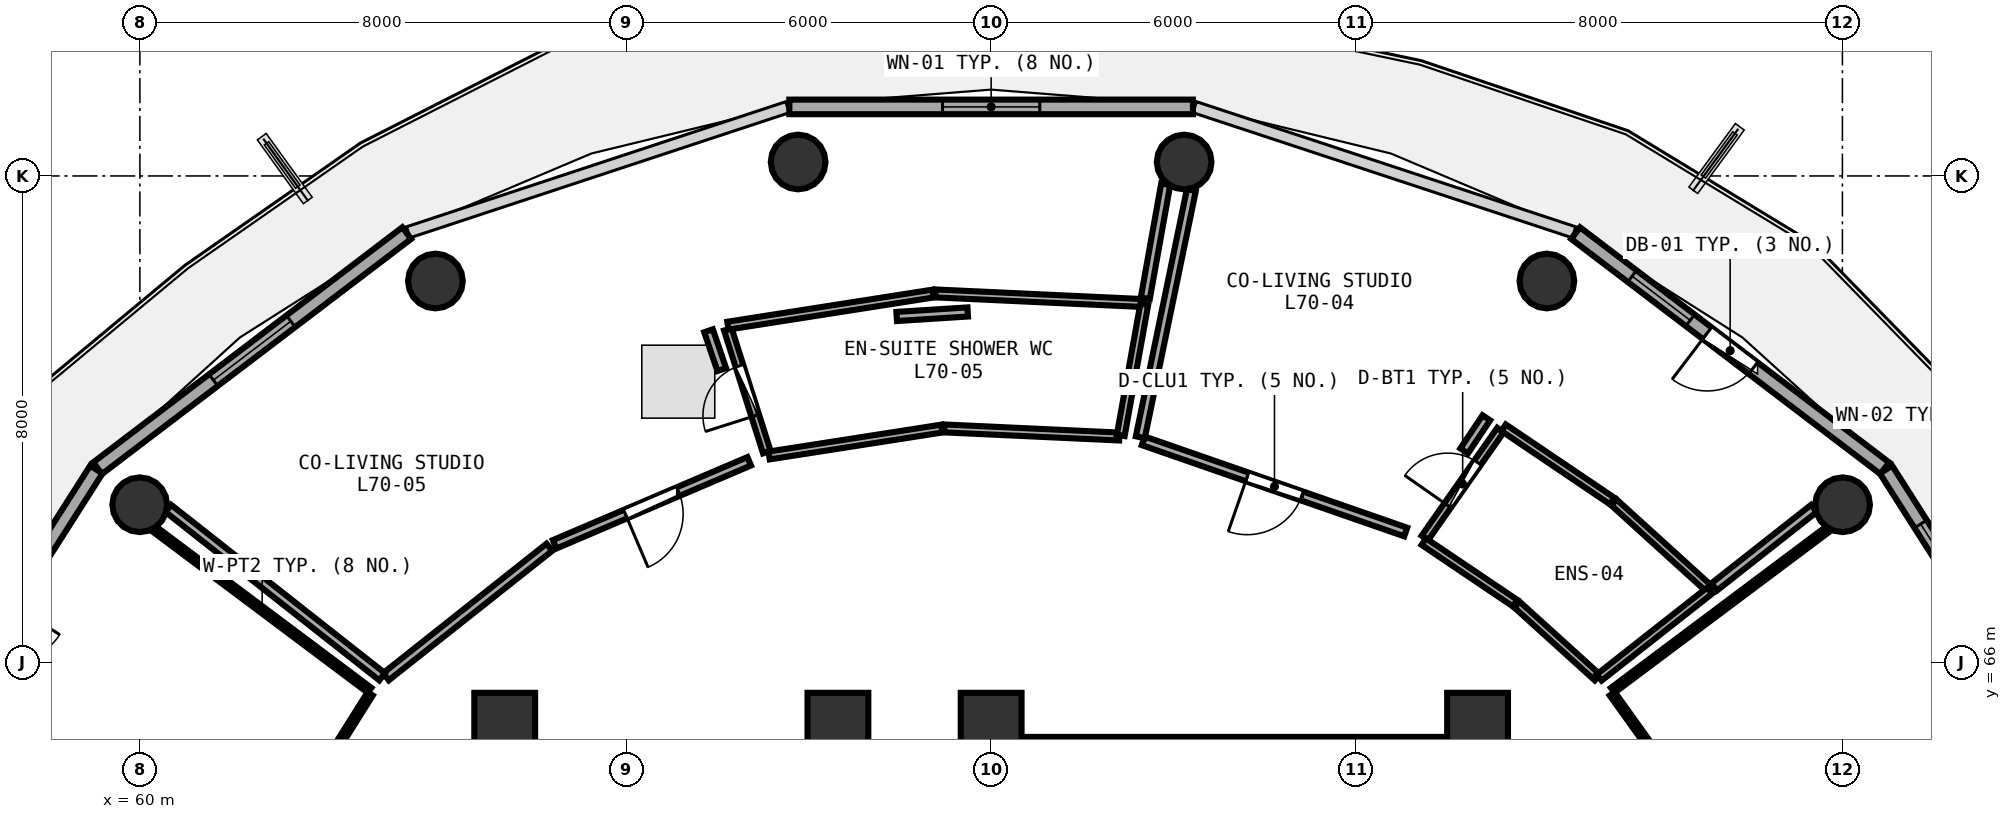
"""IFC4 building model, lengths in metres.
Left out: names, types, materials, properties, quantities, classifications, styles, units other than length and angle.
Written with IfcOpenShell. Run it as: python <this file> out.ifc"""

import sys

from ifc_helpers import new_model, si_unit, direction, frame, frame_2d, origin, origin_2d, place, context, subcontext, project, spatial, rectangle, circle, extrude, element, fill, save


model = new_model("IFC4")
c1 = context("Model", 3, precision=1e-05, world=origin(), true_north=direction((0.0, 1.0)))
c2 = subcontext(c1, "Body", "Model", "MODEL_VIEW")
j1 = project(units=[si_unit("LENGTHUNIT", "METRE"), si_unit("PLANEANGLEUNIT", "RADIAN")], contexts=[c1])
p1 = place(None, origin())
s1 = spatial("IfcSite", under=j1, at=p1, CompositionType="ELEMENT")
p2 = place(p1, origin())
s2 = spatial("IfcBuilding", under=s1, at=p2, CompositionType="ELEMENT")
p3 = place(p2, frame((0.0, 0.0, 274.95)))
s3 = spatial("IfcBuildingStorey", under=s2, at=p3, CompositionType="ELEMENT", Elevation=274.95)
for number, where, z_axis, x_axis in (
    (1, (82.0, 65.0, 0.0), (0.0, 0.0, 1.0), (1.0, 0.0, 0.0)),
    (2, (74.0, 65.0, 0.0), (0.0, 0.0, 1.0), (1.0, 0.0, 0.0)),
    (3, (71.48, 65.0, 0.0), (0.0, 0.0, 1.0), (1.0, 0.0, 0.0)),
    (4, (66.0, 65.0, 0.0), (0.0, 0.0, 1.0), (1.0, 0.0, 0.0)),
):
    element("IfcColumn", number, at=place(p3, frame(where, z_axis=z_axis, x_axis=x_axis)), inside=s3, PredefinedType="PILASTER", context=c2, shape_type="SweptSolid", body=[
        extrude(rectangle(XDim=1.0, YDim=1.0, at=origin_2d()), origin(), (0.0, 0.0, 1.0), 3.75),
    ])
for number, where, z_axis, x_axis in (
    (5, (88.003, 68.593, 0.0), (0.0, 0.0, 1.0), (1.0, 0.0, 0.0)),
    (6, (83.14, 72.272, 0.0), (0.0, 0.0, 1.0), (1.0, 0.0, 0.0)),
    (7, (77.174, 74.229, 0.0), (0.0, 0.0, 1.0), (1.0, 0.0, 0.0)),
    (8, (70.826, 74.229, 0.0), (0.0, 0.0, 1.0), (1.0, 0.0, 0.0)),
    (9, (64.86, 72.272, 0.0), (0.0, 0.0, 1.0), (1.0, 0.0, 0.0)),
    (10, (59.997, 68.593, 0.0), (0.0, 0.0, 1.0), (1.0, 0.0, 0.0)),
):
    element("IfcColumn", number, at=place(p3, frame(where, z_axis=z_axis, x_axis=x_axis)), inside=s3, PredefinedType="COLUMN", context=c2, shape_type="SweptSolid", body=[
        extrude(circle(Radius=0.45, at=origin_2d()), origin(), (0.0, 0.0, 1.0), 3.75),
    ])
p4 = place(p3, frame((92.034, 63.964, 0.0), z_axis=(0.0, 0.0, 1.0), x_axis=(-0.537271968456, 0.843409053728, 0.0)))
e11 = element("IfcWall", 11, at=p4, inside=s3, PredefinedType="SOLIDWALL", context=c2, shape_type="SweptSolid", body=[
    extrude(rectangle(XDim=6.175, YDim=0.24, at=frame_2d((3.087, 0.0))), origin(), (0.0, 0.0, 1.0), 3.475),
])
p5 = place(p4, frame((2.613, 0.0, 0.0)))
e12 = element("IfcOpeningElement", 12, at=p5, cuts=e11, PredefinedType="OPENING", context=c2, shape_type="SweptSolid", body=[
    extrude(rectangle(XDim=0.95, YDim=2.1, at=frame_2d((0.475, 1.05))), frame((0.0, 0.13, 0.0), z_axis=(0.0, -1.0, 0.0), x_axis=(1.0, 0.0, 0.0)), (0.0, 0.0, 1.0), 0.26),
])
p6 = place(p4, frame((3.913, 0.0, 0.85)))
e13 = element("IfcOpeningElement", 13, at=p6, cuts=e11, PredefinedType="OPENING", context=c2, shape_type="SweptSolid", body=[
    extrude(rectangle(XDim=1.2, YDim=1.45, at=frame_2d((0.6, 0.725))), frame((0.0, 0.13, 0.0), z_axis=(0.0, -1.0, 0.0), x_axis=(1.0, 0.0, 0.0)), (0.0, 0.0, 1.0), 0.26),
])
p7 = place(p3, frame((88.696, 69.194, 0.0), z_axis=(0.0, 0.0, 1.0), x_axis=(-0.796010444211, 0.605282886514, 0.0)))
e14 = element("IfcWall", 14, at=p7, inside=s3, PredefinedType="SOLIDWALL", context=c2, shape_type="SweptSolid", body=[
    extrude(rectangle(XDim=6.387, YDim=0.24, at=frame_2d((3.194, 0.0))), origin(), (0.0, 0.0, 1.0), 3.475),
])
p8 = place(p7, frame((2.719, 0.0, 0.0)))
e15 = element("IfcOpeningElement", 15, at=p8, cuts=e14, PredefinedType="OPENING", context=c2, shape_type="SweptSolid", body=[
    extrude(rectangle(XDim=0.95, YDim=2.1, at=frame_2d((0.475, 1.05))), frame((0.0, 0.13, 0.0), z_axis=(0.0, -1.0, 0.0), x_axis=(1.0, 0.0, 0.0)), (0.0, 0.0, 1.0), 0.26),
])
p9 = place(p7, frame((4.019, 0.0, 0.85)))
e16 = element("IfcOpeningElement", 16, at=p9, cuts=e14, PredefinedType="OPENING", context=c2, shape_type="SweptSolid", body=[
    extrude(rectangle(XDim=1.2, YDim=1.45, at=frame_2d((0.6, 0.725))), frame((0.0, 0.13, 0.0), z_axis=(0.0, -1.0, 0.0), x_axis=(1.0, 0.0, 0.0)), (0.0, 0.0, 1.0), 0.26),
])
p10 = place(p3, frame((77.319, 75.136, 0.0), z_axis=(0.0, 0.0, 1.0), x_axis=(-1.0, 0.0, 0.0)))
e17 = element("IfcWall", 17, at=p10, inside=s3, PredefinedType="SOLIDWALL", context=c2, shape_type="SweptSolid", body=[
    extrude(rectangle(XDim=6.638, YDim=0.24, at=frame_2d((3.319, 0.0))), origin(), (0.0, 0.0, 1.0), 3.475),
])
p11 = place(p10, frame((2.519, 0.0, 0.85)))
e18 = element("IfcOpeningElement", 18, at=p11, cuts=e17, PredefinedType="OPENING", context=c2, shape_type="SweptSolid", body=[
    extrude(rectangle(XDim=1.6, YDim=1.45, at=frame_2d((0.8, 0.725))), frame((0.0, 0.13, 0.0), z_axis=(0.0, -1.0, 0.0), x_axis=(1.0, 0.0, 0.0)), (0.0, 0.0, 1.0), 0.26),
])
p12 = place(p3, frame((64.388, 73.06, 0.0), z_axis=(0.0, 0.0, 1.0), x_axis=(-0.796010444211, -0.605282886514, 0.0)))
e19 = element("IfcWall", 19, at=p12, inside=s3, PredefinedType="SOLIDWALL", context=c2, shape_type="SweptSolid", body=[
    extrude(rectangle(XDim=6.387, YDim=0.24, at=frame_2d((3.194, 0.0))), origin(), (0.0, 0.0, 1.0), 3.475),
])
p13 = place(p12, frame((2.394, 0.0, 0.85)))
e20 = element("IfcOpeningElement", 20, at=p13, cuts=e19, PredefinedType="OPENING", context=c2, shape_type="SweptSolid", body=[
    extrude(rectangle(XDim=1.6, YDim=1.45, at=frame_2d((0.8, 0.725))), frame((0.0, 0.13, 0.0), z_axis=(0.0, -1.0, 0.0), x_axis=(1.0, 0.0, 0.0)), (0.0, 0.0, 1.0), 0.26),
])
p14 = place(p3, frame((59.284, 69.172, 0.0), z_axis=(0.0, 0.0, 1.0), x_axis=(-0.537271968456, -0.843409053728, 0.0)))
e21 = element("IfcWall", 21, at=p14, inside=s3, PredefinedType="SOLIDWALL", context=c2, shape_type="SweptSolid", body=[
    extrude(rectangle(XDim=6.175, YDim=0.24, at=frame_2d((3.087, 0.0))), origin(), (0.0, 0.0, 1.0), 3.475),
])
p15 = place(p14, frame((2.613, 0.0, 0.0)))
e22 = element("IfcOpeningElement", 22, at=p15, cuts=e21, PredefinedType="OPENING", context=c2, shape_type="SweptSolid", body=[
    extrude(rectangle(XDim=0.95, YDim=2.1, at=frame_2d((0.475, 1.05))), frame((0.0, 0.13, 0.0), z_axis=(0.0, -1.0, 0.0), x_axis=(1.0, 0.0, 0.0)), (0.0, 0.0, 1.0), 0.26),
])
p16 = place(p14, frame((3.913, 0.0, 0.85)))
e23 = element("IfcOpeningElement", 23, at=p16, cuts=e21, PredefinedType="OPENING", context=c2, shape_type="SweptSolid", body=[
    extrude(rectangle(XDim=1.2, YDim=1.45, at=frame_2d((0.6, 0.725))), frame((0.0, 0.13, 0.0), z_axis=(0.0, -1.0, 0.0), x_axis=(1.0, 0.0, 0.0)), (0.0, 0.0, 1.0), 0.26),
])
p17 = place(p3, frame((74.0, 64.6, 0.0), z_axis=(0.0, 0.0, 1.0), x_axis=(1.0, 0.0, 0.0)))
e24 = element("IfcWall", 24, at=p17, inside=s3, PredefinedType="SHEAR", context=c2, shape_type="SweptSolid", body=[
    extrude(rectangle(XDim=8.0, YDim=0.35, at=frame_2d((4.0, 0.0))), origin(), (0.0, 0.0, 1.0), 3.49),
])
p18 = place(p3, frame((81.133, 68.047, 0.0), z_axis=(0.0, 0.0, 1.0), x_axis=(0.573764741577, 0.81902015929, 0.0)))
e25 = element("IfcWall", 25, at=p18, inside=s3, PredefinedType="PLUMBINGWALL", context=c2, shape_type="SweptSolid", body=[
    extrude(rectangle(XDim=2.167, YDim=0.13, at=frame_2d((1.083, 0.0))), origin(), (0.0, 0.0, 1.0), 3.175),
])
p19 = place(p18, frame((0.653, 0.0, 0.0)))
e26 = element("IfcOpeningElement", 26, at=p19, cuts=e25, PredefinedType="OPENING", context=c2, shape_type="SweptSolid", body=[
    extrude(rectangle(XDim=0.86, YDim=2.05, at=frame_2d((0.43, 1.025))), frame((0.0, 0.075, 0.0), z_axis=(0.0, -1.0, 0.0), x_axis=(1.0, 0.0, 0.0)), (0.0, 0.0, 1.0), 0.15),
])
p20 = place(p3, frame((80.818, 68.145, 0.0), z_axis=(0.0, 0.0, 1.0), x_axis=(-0.944627899296, 0.328143462331, 0.0)))
e27 = element("IfcWall", 27, at=p20, inside=s3, PredefinedType="PARTITIONING", context=c2, shape_type="SweptSolid", body=[
    extrude(rectangle(XDim=4.57, YDim=0.15, at=frame_2d((2.285, 0.0))), origin(), (0.0, 0.0, 1.0), 3.48),
])
p21 = place(p20, frame((1.81, 0.0, 0.0)))
e28 = element("IfcOpeningElement", 28, at=p21, cuts=e27, PredefinedType="OPENING", context=c2, shape_type="SweptSolid", body=[
    extrude(rectangle(XDim=0.95, YDim=2.08, at=frame_2d((0.475, 1.04))), frame((0.0, 0.085, 0.0), z_axis=(0.0, -1.0, 0.0), x_axis=(1.0, 0.0, 0.0)), (0.0, 0.0, 1.0), 0.17),
])
p22 = place(p3, frame((70.311, 69.457, 0.0), z_axis=(0.0, 0.0, 1.0), x_axis=(-0.302652199947, 0.953101068023, 0.0)))
e29 = element("IfcWall", 29, at=p22, inside=s3, PredefinedType="PLUMBINGWALL", context=c2, shape_type="SweptSolid", body=[
    extrude(rectangle(XDim=2.12, YDim=0.13, at=frame_2d((1.06, 0.0))), origin(), (0.0, 0.0, 1.0), 3.175),
])
p23 = place(p22, frame((0.63, 0.0, 0.0)))
e30 = element("IfcOpeningElement", 30, at=p23, cuts=e29, PredefinedType="OPENING", context=c2, shape_type="SweptSolid", body=[
    extrude(rectangle(XDim=0.86, YDim=2.05, at=frame_2d((0.43, 1.025))), frame((0.0, 0.075, 0.0), z_axis=(0.0, -1.0, 0.0), x_axis=(1.0, 0.0, 0.0)), (0.0, 0.0, 1.0), 0.15),
])
p24 = place(p3, frame((70.021, 69.308, 0.0), z_axis=(0.0, 0.0, 1.0), x_axis=(-0.919764656354, -0.392470351647, 0.0)))
e31 = element("IfcWall", 31, at=p24, inside=s3, PredefinedType="PARTITIONING", context=c2, shape_type="SweptSolid", body=[
    extrude(rectangle(XDim=3.479, YDim=0.15, at=frame_2d((1.739, 0.0))), origin(), (0.0, 0.0, 1.0), 3.235),
])
p25 = place(p24, frame((1.264, 0.0, 0.0)))
e32 = element("IfcOpeningElement", 32, at=p25, cuts=e31, PredefinedType="OPENING", context=c2, shape_type="SweptSolid", body=[
    extrude(rectangle(XDim=0.95, YDim=2.08, at=frame_2d((0.475, 1.04))), frame((0.0, 0.085, 0.0), z_axis=(0.0, -1.0, 0.0), x_axis=(1.0, 0.0, 0.0)), (0.0, 0.0, 1.0), 0.17),
])
p26 = place(p3, frame((85.77, 63.316, 0.0), z_axis=(0.0, 0.0, 1.0), x_axis=(-0.582725386778, 0.812669135383, 0.0)))
e33 = element("IfcWall", 33, at=p26, inside=s3, PredefinedType="PARTITIONING", context=c2, shape_type="SweptSolid", body=[
    extrude(rectangle(XDim=2.669, YDim=0.1, at=frame_2d((1.334, 0.0))), origin(), (0.0, 0.0, 1.0), 3.075),
])
p27 = place(p3, frame((84.223, 65.542, 0.0), z_axis=(0.0, 0.0, 1.0), x_axis=(0.800384816546, 0.599486568191, 0.0)))
e34 = element("IfcWall", 34, at=p27, inside=s3, PredefinedType="PARTITIONING", context=c2, shape_type="SweptSolid", body=[
    extrude(rectangle(XDim=4.414, YDim=0.1, at=frame_2d((2.207, 0.0))), origin(), (0.0, 0.0, 1.0), 3.175),
])
p28 = place(p3, frame((83.97, 65.753, 0.0), z_axis=(0.0, 0.0, 1.0), x_axis=(-0.741337974143, 0.671131885767, 0.0)))
e35 = element("IfcWall", 35, at=p28, inside=s3, PredefinedType="PLUMBINGWALL", context=c2, shape_type="SweptSolid", body=[
    extrude(rectangle(XDim=1.784, YDim=0.13, at=frame_2d((0.892, 0.0))), origin(), (0.0, 0.0, 1.0), 3.075),
])
p29 = place(p3, frame((82.616, 66.975, 0.0), z_axis=(0.0, 0.0, 1.0), x_axis=(-0.82921750612, 0.558926048367, 0.0)))
e36 = element("IfcWall", 36, at=p29, inside=s3, PredefinedType="PLUMBINGWALL", context=c2, shape_type="SweptSolid", body=[
    extrude(rectangle(XDim=1.81, YDim=0.13, at=frame_2d((0.905, 0.0))), origin(), (0.0, 0.0, 1.0), 3.075),
])
p30 = place(p3, frame((82.427, 69.86, 0.0), z_axis=(0.0, 0.0, 1.0), x_axis=(0.828897302699, -0.559400805843, 0.0)))
e37 = element("IfcWall", 37, at=p30, inside=s3, PredefinedType="PLUMBINGWALL", context=c2, shape_type="SweptSolid", body=[
    extrude(rectangle(XDim=2.153, YDim=0.13, at=frame_2d((1.077, 0.0))), origin(), (0.0, 0.0, 1.0), 3.075),
])
p31 = place(p3, frame((84.244, 68.631, 0.0), z_axis=(0.0, 0.0, 1.0), x_axis=(0.740450028949, -0.672111415339, 0.0)))
e38 = element("IfcWall", 38, at=p31, inside=s3, PredefinedType="PLUMBINGWALL", context=c2, shape_type="SweptSolid", body=[
    extrude(rectangle(XDim=2.122, YDim=0.13, at=frame_2d((1.061, 0.0))), origin(), (0.0, 0.0, 1.0), 3.075),
])
p32 = place(p3, frame((85.814, 67.179, 0.0), z_axis=(0.0, 0.0, 1.0), x_axis=(-0.786024493366, -0.618195354098, 0.0)))
e39 = element("IfcWall", 39, at=p32, inside=s3, PredefinedType="PLUMBINGWALL", context=c2, shape_type="SweptSolid", body=[
    extrude(rectangle(XDim=2.307, YDim=0.13, at=frame_2d((1.154, 0.0))), origin(), (0.0, 0.0, 1.0), 3.075),
])
p33 = place(p3, frame((76.453, 69.703, 0.0), z_axis=(0.0, 0.0, 1.0), x_axis=(0.202308141573, 0.979321916355, 0.0)))
e40 = element("IfcWall", 40, at=p33, inside=s3, PredefinedType="PARTITIONING", context=c2, shape_type="SweptSolid", body=[
    extrude(rectangle(XDim=4.153, YDim=0.15, at=frame_2d((2.076, 0.0))), origin(), (0.0, 0.0, 1.0), 3.175),
])
p34 = place(p3, frame((87.532, 68.533, 0.0), z_axis=(0.0, 0.0, 1.0), x_axis=(-0.785863630792, -0.618399833278, 0.0)))
e41 = element("IfcWall", 41, at=p34, inside=s3, PredefinedType="PARTITIONING", context=c2, shape_type="SweptSolid", body=[
    extrude(rectangle(XDim=2.088, YDim=0.15, at=frame_2d((1.044, 0.0))), origin(), (0.0, 0.0, 1.0), 3.075),
])
p35 = place(p3, frame((82.144, 70.023, 0.0), z_axis=(0.0, 0.0, 1.0), x_axis=(-0.555818041334, -0.831303978655, 0.0)))
e42 = element("IfcWall", 42, at=p35, inside=s3, PredefinedType="PARTITIONING", context=c2, shape_type="SweptSolid", body=[
    extrude(rectangle(XDim=0.655, YDim=0.15, at=frame_2d((0.328, 0.0))), origin(), (0.0, 0.0, 1.0), 3.175),
])
p36 = place(p3, frame((76.108, 69.715, 0.0), z_axis=(0.0, 0.0, 1.0), x_axis=(-0.998929756222, 0.046253022973, 0.0)))
e43 = element("IfcWall", 43, at=p36, inside=s3, PredefinedType="PLUMBINGWALL", context=c2, shape_type="SweptSolid", body=[
    extrude(rectangle(XDim=2.882, YDim=0.13, at=frame_2d((1.441, 0.0))), origin(), (0.0, 0.0, 1.0), 3.075),
])
p37 = place(p3, frame((73.189, 69.846, 0.0), z_axis=(0.0, 0.0, 1.0), x_axis=(-0.988061369803, -0.154060798076, 0.0)))
e44 = element("IfcWall", 44, at=p37, inside=s3, PredefinedType="PLUMBINGWALL", context=c2, shape_type="SweptSolid", body=[
    extrude(rectangle(XDim=2.875, YDim=0.13, at=frame_2d((1.438, 0.0))), origin(), (0.0, 0.0, 1.0), 3.075),
])
p38 = place(p3, frame((69.671, 71.538, 0.0), z_axis=(0.0, 0.0, 1.0), x_axis=(0.987971430303, 0.154636518665, 0.0)))
e45 = element("IfcWall", 45, at=p38, inside=s3, PredefinedType="PLUMBINGWALL", context=c2, shape_type="SweptSolid", body=[
    extrude(rectangle(XDim=3.413, YDim=0.13, at=frame_2d((1.707, 0.0))), origin(), (0.0, 0.0, 1.0), 3.075),
])
p39 = place(p3, frame((73.083, 72.068, 0.0), z_axis=(0.0, 0.0, 1.0), x_axis=(0.998931144294, -0.046223034954, 0.0)))
e46 = element("IfcWall", 46, at=p39, inside=s3, PredefinedType="PLUMBINGWALL", context=c2, shape_type="SweptSolid", body=[
    extrude(rectangle(XDim=3.423, YDim=0.13, at=frame_2d((1.711, 0.0))), origin(), (0.0, 0.0, 1.0), 3.075),
])
p40 = place(p3, frame((76.519, 71.889, 0.0), z_axis=(0.0, 0.0, 1.0), x_axis=(-0.176677907616, -0.984268721925, 0.0)))
e47 = element("IfcWall", 47, at=p40, inside=s3, PredefinedType="PLUMBINGWALL", context=c2, shape_type="SweptSolid", body=[
    extrude(rectangle(XDim=2.19, YDim=0.13, at=frame_2d((1.095, 0.0))), origin(), (0.0, 0.0, 1.0), 3.075),
])
p41 = place(p3, frame((66.735, 67.894, 0.0), z_axis=(0.0, 0.0, 1.0), x_axis=(-0.78387401132, -0.620919909793, 0.0)))
e48 = element("IfcWall", 48, at=p41, inside=s3, PredefinedType="PARTITIONING", context=c2, shape_type="SweptSolid", body=[
    extrude(rectangle(XDim=3.429, YDim=0.15, at=frame_2d((1.715, 0.0))), origin(), (0.0, 0.0, 1.0), 3.075),
])
p42 = place(p3, frame((63.984, 65.765, 0.0), z_axis=(0.0, 0.0, 1.0), x_axis=(-0.785736749878, 0.618561039745, 0.0)))
e49 = element("IfcWall", 49, at=p42, inside=s3, PredefinedType="PARTITIONING", context=c2, shape_type="SweptSolid", body=[
    extrude(rectangle(XDim=4.475, YDim=0.15, at=frame_2d((2.237, 0.0))), origin(), (0.0, 0.0, 1.0), 3.075),
])
p43 = place(p3, frame((76.871, 73.864, 0.0), z_axis=(0.0, 0.0, 1.0), x_axis=(-0.17618059525, -0.984357860667, 0.0)))
e50 = element("IfcWall", 50, at=p43, inside=s3, PredefinedType="PARTITIONING", context=c2, shape_type="SweptSolid", body=[
    extrude(rectangle(XDim=1.907, YDim=0.15, at=frame_2d((0.953, 0.0))), origin(), (0.0, 0.0, 1.0), 3.075),
])
p44 = place(p3, frame((73.615, 71.763, 0.0), z_axis=(0.0, 0.0, 1.0), x_axis=(-0.998000282266, -0.063209466038, 0.0)))
e51 = element("IfcWall", 51, at=p44, inside=s3, PredefinedType="PARTITIONING", context=c2, shape_type="SweptSolid", body=[
    extrude(rectangle(XDim=1.17, YDim=0.15, at=frame_2d((0.585, 0.0))), origin(), (0.0, 0.0, 1.0), 3.48),
])
p45 = place(p3, frame((69.352, 71.454, 0.0), z_axis=(0.0, 0.0, 1.0), x_axis=(0.322961742759, -0.946412020588, 0.0)))
e52 = element("IfcWall", 52, at=p45, inside=s3, PredefinedType="PARTITIONING", context=c2, shape_type="SweptSolid", body=[
    extrude(rectangle(XDim=0.674, YDim=0.15, at=frame_2d((0.337, 0.0))), origin(), (0.0, 0.0, 1.0), 3.48),
])
p46 = place(p3, frame((63.788, 65.484, 0.0), z_axis=(0.0, 0.0, 1.0), x_axis=(-0.532251611419, -0.846586216603, 0.0)))
e53 = element("IfcWall", 53, at=p46, inside=s3, PredefinedType="PARTITIONING", context=c2, shape_type="SweptSolid", body=[
    extrude(rectangle(XDim=4.059, YDim=0.1, at=frame_2d((2.03, 0.0))), origin(), (0.0, 0.0, 1.0), 3.075),
])
p47 = place(p3, frame((60.244, 68.188, 0.0), z_axis=(0.0, 0.0, 1.0), x_axis=(0.800384816546, -0.599486568191, 0.0)))
e54 = element("IfcWall", 54, at=p47, inside=s3, PredefinedType="PARTITIONING", context=c2, shape_type="SweptSolid", body=[
    extrude(rectangle(XDim=4.414, YDim=0.1, at=frame_2d((2.207, 0.0))), origin(), (0.0, 0.0, 1.0), 3.175),
])
p48 = place(p6, origin())
e55 = element("IfcWindow", 55, at=p48, inside=s3, PartitioningType="SINGLE_PANEL", PredefinedType="WINDOW", context=c2, shape_type="SweptSolid", body=[
    extrude(rectangle(XDim=1.2, YDim=1.45, at=frame_2d((0.6, 0.725))), frame((0.0, 0.03, 0.0), z_axis=(0.0, -1.0, 0.0), x_axis=(1.0, 0.0, 0.0)), (0.0, 0.0, 1.0), 0.06),
])
fill(e13, e55)
p49 = place(p8, frame((0.95, 0.0, 0.0), z_axis=(0.0, 0.0, 1.0), x_axis=(-1.0, 0.0, 0.0)))
e56 = element("IfcDoor", 56, at=p49, inside=s3, OperationType="SINGLE_SWING_LEFT", PredefinedType="DOOR", context=c2, shape_type="SweptSolid", body=[
    extrude(rectangle(XDim=0.95, YDim=2.1, at=frame_2d((0.475, 1.05))), frame((0.0, 0.025, 0.0), z_axis=(0.0, -1.0, 0.0), x_axis=(1.0, 0.0, 0.0)), (0.0, 0.0, 1.0), 0.05),
])
fill(e15, e56)
p50 = place(p9, origin())
e57 = element("IfcWindow", 57, at=p50, inside=s3, PartitioningType="SINGLE_PANEL", PredefinedType="WINDOW", context=c2, shape_type="SweptSolid", body=[
    extrude(rectangle(XDim=1.2, YDim=1.45, at=frame_2d((0.6, 0.725))), frame((0.0, 0.03, 0.0), z_axis=(0.0, -1.0, 0.0), x_axis=(1.0, 0.0, 0.0)), (0.0, 0.0, 1.0), 0.06),
])
fill(e16, e57)
p51 = place(p11, origin())
e58 = element("IfcWindow", 58, at=p51, inside=s3, PartitioningType="SINGLE_PANEL", PredefinedType="WINDOW", context=c2, shape_type="SweptSolid", body=[
    extrude(rectangle(XDim=1.6, YDim=1.45, at=frame_2d((0.8, 0.725))), frame((0.0, 0.03, 0.0), z_axis=(0.0, -1.0, 0.0), x_axis=(1.0, 0.0, 0.0)), (0.0, 0.0, 1.0), 0.06),
])
fill(e18, e58)
p52 = place(p13, origin())
e59 = element("IfcWindow", 59, at=p52, inside=s3, PartitioningType="SINGLE_PANEL", PredefinedType="WINDOW", context=c2, shape_type="SweptSolid", body=[
    extrude(rectangle(XDim=1.6, YDim=1.45, at=frame_2d((0.8, 0.725))), frame((0.0, 0.03, 0.0), z_axis=(0.0, -1.0, 0.0), x_axis=(1.0, 0.0, 0.0)), (0.0, 0.0, 1.0), 0.06),
])
fill(e20, e59)
p53 = place(p19, origin())
e60 = element("IfcDoor", 60, at=p53, inside=s3, OperationType="SINGLE_SWING_LEFT", PredefinedType="DOOR", context=c2, shape_type="SweptSolid", body=[
    extrude(rectangle(XDim=0.86, YDim=2.05, at=frame_2d((0.43, 1.025))), frame((0.0, 0.025, 0.0), z_axis=(0.0, -1.0, 0.0), x_axis=(1.0, 0.0, 0.0)), (0.0, 0.0, 1.0), 0.05),
])
fill(e26, e60)
p54 = place(p21, origin())
e61 = element("IfcDoor", 61, at=p54, inside=s3, OperationType="SINGLE_SWING_RIGHT", PredefinedType="DOOR", context=c2, shape_type="SweptSolid", body=[
    extrude(rectangle(XDim=0.95, YDim=2.08, at=frame_2d((0.475, 1.04))), frame((0.0, 0.025, 0.0), z_axis=(0.0, -1.0, 0.0), x_axis=(1.0, 0.0, 0.0)), (0.0, 0.0, 1.0), 0.05),
])
fill(e28, e61)
p55 = place(p23, origin())
e62 = element("IfcDoor", 62, at=p55, inside=s3, OperationType="SINGLE_SWING_LEFT", PredefinedType="DOOR", context=c2, shape_type="SweptSolid", body=[
    extrude(rectangle(XDim=0.86, YDim=2.05, at=frame_2d((0.43, 1.025))), frame((0.0, 0.025, 0.0), z_axis=(0.0, -1.0, 0.0), x_axis=(1.0, 0.0, 0.0)), (0.0, 0.0, 1.0), 0.05),
])
fill(e30, e62)
p56 = place(p25, origin())
e63 = element("IfcDoor", 63, at=p56, inside=s3, OperationType="SINGLE_SWING_RIGHT", PredefinedType="DOOR", context=c2, shape_type="SweptSolid", body=[
    extrude(rectangle(XDim=0.95, YDim=2.08, at=frame_2d((0.475, 1.04))), frame((0.0, 0.025, 0.0), z_axis=(0.0, -1.0, 0.0), x_axis=(1.0, 0.0, 0.0)), (0.0, 0.0, 1.0), 0.05),
])
fill(e32, e63)
save(model, sys.argv[1])
